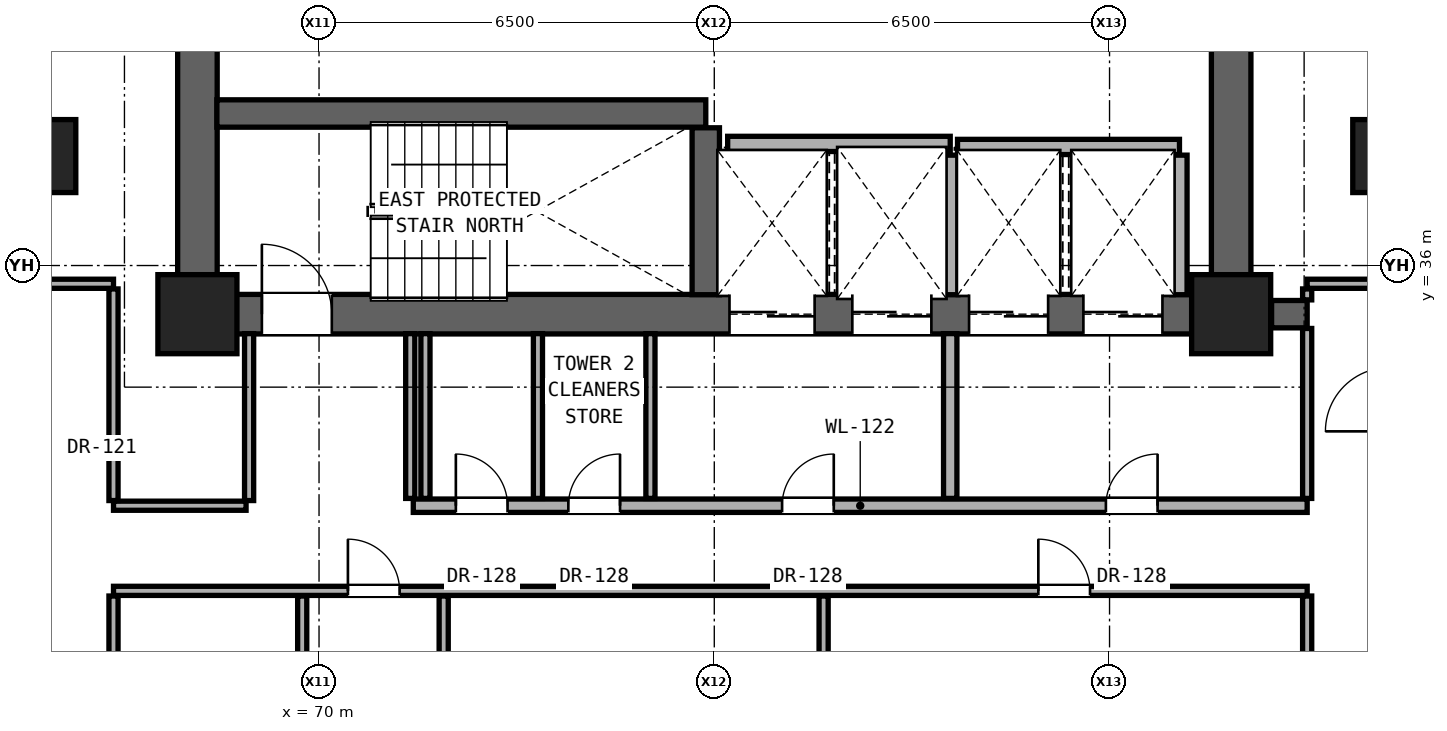
"""IFC4 building model, lengths in metres.
Left out: names, types, materials, properties, quantities, classifications, styles, units other than length and angle.
Written with IfcOpenShell. Run it as: python <this file> out.ifc"""

import sys

from ifc_helpers import new_model, si_unit, direction, frame, frame_2d, origin, origin_2d, place, context, subcontext, project, spatial, rectangle, extrude, element, fill, save


model = new_model("IFC4")
c1 = context("Model", 3, precision=1e-05, world=origin(), true_north=direction((0.0, 1.0)))
c2 = subcontext(c1, "Body", "Model", "MODEL_VIEW")
j1 = project(units=[si_unit("LENGTHUNIT", "METRE"), si_unit("PLANEANGLEUNIT", "RADIAN")], contexts=[c1])
p1 = place(None, origin())
s1 = spatial("IfcSite", under=j1, at=p1, CompositionType="ELEMENT")
p2 = place(p1, origin())
s2 = spatial("IfcBuilding", under=s1, at=p2, CompositionType="ELEMENT")
p3 = place(p2, frame((0.0, 0.0, 52.1)))
s3 = spatial("IfcBuildingStorey", under=s2, at=p3, CompositionType="ELEMENT", Elevation=52.1)
for number, where, z_axis, x_axis in (
    (1, (68.0, 35.2, 0.0), (0.0, 0.0, 1.0), (1.0, 0.0, 0.0)),
    (2, (85.0, 35.2, 0.0), (0.0, 0.0, 1.0), (1.0, 0.0, 0.0)),
):
    element("IfcColumn", number, at=place(p3, frame(where, z_axis=z_axis, x_axis=x_axis)), inside=s3, PredefinedType="COLUMN", context=c2, shape_type="SweptSolid", body=[
        extrude(rectangle(XDim=1.3, YDim=1.3, at=origin_2d()), origin(), (0.0, 0.0, 1.0), 3.3),
    ])
for number, where, z_axis, x_axis in (
    (3, (65.6, 37.8, 0.0), (0.0, 0.0, 1.0), (1.0, 0.0, 0.0)),
    (4, (87.4, 37.8, 0.0), (0.0, 0.0, 1.0), (1.0, 0.0, 0.0)),
):
    element("IfcColumn", number, at=place(p3, frame(where, z_axis=z_axis, x_axis=x_axis)), inside=s3, PredefinedType="PILASTER", context=c2, shape_type="SweptSolid", body=[
        extrude(rectangle(XDim=0.8, YDim=1.2, at=origin_2d()), origin(), (0.0, 0.0, 1.0), 3.3),
    ])
for number, where, z_axis, x_axis in (
    (5, (68.0, 35.2, 0.0), (0.0, 0.0, 1.0), (0.0, 1.0, 0.0)),
    (6, (85.0, 35.2, 0.0), (0.0, 0.0, 1.0), (0.0, 1.0, 0.0)),
):
    element("IfcWall", number, at=place(p3, frame(where, z_axis=z_axis, x_axis=x_axis)), inside=s3, PredefinedType="SHEAR", context=c2, shape_type="SweptSolid", body=[
        extrude(rectangle(XDim=5.6, YDim=0.65, at=frame_2d((2.8, 0.0))), origin(), (0.0, 0.0, 1.0), 3.06),
    ])
p4 = place(p3, frame((68.0, 35.2, 0.0), z_axis=(0.0, 0.0, 1.0), x_axis=(1.0, 0.0, 0.0)))
e7 = element("IfcWall", 7, at=p4, inside=s3, PredefinedType="SHEAR", context=c2, shape_type="SweptSolid", body=[
    extrude(rectangle(XDim=17.0, YDim=0.65, at=frame_2d((8.5, 0.0))), origin(), (0.0, 0.0, 1.0), 3.06),
])
p5 = place(p4, frame((1.06, 0.0, 0.0)))
e8 = element("IfcOpeningElement", 8, at=p5, cuts=e7, PredefinedType="OPENING", context=c2, shape_type="SweptSolid", body=[
    extrude(rectangle(XDim=1.15, YDim=2.2, at=frame_2d((0.575, 1.1))), frame((0.0, 0.335, 0.0), z_axis=(0.0, -1.0, 0.0), x_axis=(1.0, 0.0, 0.0)), (0.0, 0.0, 1.0), 0.67),
])
p6 = place(p4, frame((8.75, 0.0, 0.0)))
e9 = element("IfcOpeningElement", 9, at=p6, cuts=e7, PredefinedType="OPENING", context=c2, shape_type="SweptSolid", body=[
    extrude(rectangle(XDim=1.4, YDim=2.35, at=frame_2d((0.7, 1.175))), frame((0.0, 0.335, 0.0), z_axis=(0.0, -1.0, 0.0), x_axis=(1.0, 0.0, 0.0)), (0.0, 0.0, 1.0), 0.67),
])
p7 = place(p4, frame((10.77, 0.0, 0.0)))
e10 = element("IfcOpeningElement", 10, at=p7, cuts=e7, PredefinedType="OPENING", context=c2, shape_type="SweptSolid", body=[
    extrude(rectangle(XDim=1.3, YDim=2.3, at=frame_2d((0.65, 1.15))), frame((0.0, 0.335, 0.0), z_axis=(0.0, -1.0, 0.0), x_axis=(1.0, 0.0, 0.0)), (0.0, 0.0, 1.0), 0.67),
])
p8 = place(p4, frame((12.69, 0.0, 0.0)))
e11 = element("IfcOpeningElement", 11, at=p8, cuts=e7, PredefinedType="OPENING", context=c2, shape_type="SweptSolid", body=[
    extrude(rectangle(XDim=1.3, YDim=2.3, at=frame_2d((0.65, 1.15))), frame((0.0, 0.335, 0.0), z_axis=(0.0, -1.0, 0.0), x_axis=(1.0, 0.0, 0.0)), (0.0, 0.0, 1.0), 0.67),
])
p9 = place(p4, frame((14.57, 0.0, 0.0)))
e12 = element("IfcOpeningElement", 12, at=p9, cuts=e7, PredefinedType="OPENING", context=c2, shape_type="SweptSolid", body=[
    extrude(rectangle(XDim=1.3, YDim=2.3, at=frame_2d((0.65, 1.15))), frame((0.0, 0.335, 0.0), z_axis=(0.0, -1.0, 0.0), x_axis=(1.0, 0.0, 0.0)), (0.0, 0.0, 1.0), 0.67),
])
p10 = place(p3, frame((66.62, 30.65, 0.0), z_axis=(0.0, 0.0, 1.0), x_axis=(1.0, 0.0, 0.0)))
e13 = element("IfcWall", 13, at=p10, inside=s3, PredefinedType="PARTITIONING", context=c2, shape_type="SweptSolid", body=[
    extrude(rectangle(XDim=19.63, YDim=0.15, at=frame_2d((9.815, 0.0))), origin(), (0.0, 0.0, 1.0), 2.125),
])
p11 = place(p10, frame((3.855, 0.0, 0.0)))
e14 = element("IfcOpeningElement", 14, at=p11, cuts=e13, PredefinedType="OPENING", context=c2, shape_type="SweptSolid", body=[
    extrude(rectangle(XDim=0.85, YDim=2.01, at=frame_2d((0.425, 1.005))), frame((0.0, 0.085, 0.0), z_axis=(0.0, -1.0, 0.0), x_axis=(1.0, 0.0, 0.0)), (0.0, 0.0, 1.0), 0.17),
])
p12 = place(p10, frame((15.209, 0.0, 0.0)))
e15 = element("IfcOpeningElement", 15, at=p12, cuts=e13, PredefinedType="OPENING", context=c2, shape_type="SweptSolid", body=[
    extrude(rectangle(XDim=0.85, YDim=2.01, at=frame_2d((0.425, 1.005))), frame((0.0, 0.085, 0.0), z_axis=(0.0, -1.0, 0.0), x_axis=(1.0, 0.0, 0.0)), (0.0, 0.0, 1.0), 0.17),
])
p13 = place(p3, frame((66.62, 32.05, 0.0), z_axis=(0.0, 0.0, 1.0), x_axis=(1.0, 0.0, 0.0)))
e16 = element("IfcWall", 16, at=p13, inside=s3, PredefinedType="PARTITIONING", context=c2, shape_type="SweptSolid", body=[
    extrude(rectangle(XDim=2.18, YDim=0.15, at=frame_2d((1.09, 0.0))), origin(), (0.0, 0.0, 1.0), 2.125),
])
p14 = place(p3, frame((71.55, 32.05, 0.0), z_axis=(0.0, 0.0, 1.0), x_axis=(1.0, 0.0, 0.0)))
e17 = element("IfcWall", 17, at=p14, inside=s3, PredefinedType="SOLIDWALL", context=c2, shape_type="SweptSolid", body=[
    extrude(rectangle(XDim=14.7, YDim=0.22, at=frame_2d((7.35, 0.0))), origin(), (0.0, 0.0, 1.0), 2.125),
])
p15 = place(p14, frame((11.39, 0.0, 0.0)))
e18 = element("IfcOpeningElement", 18, at=p15, cuts=e17, PredefinedType="OPENING", context=c2, shape_type="SweptSolid", body=[
    extrude(rectangle(XDim=0.85, YDim=2.01, at=frame_2d((0.425, 1.005))), frame((0.0, 0.12, 0.0), z_axis=(0.0, -1.0, 0.0), x_axis=(1.0, 0.0, 0.0)), (0.0, 0.0, 1.0), 0.24),
])
p16 = place(p14, frame((6.065, 0.0, 0.0)))
e19 = element("IfcOpeningElement", 19, at=p16, cuts=e17, PredefinedType="OPENING", context=c2, shape_type="SweptSolid", body=[
    extrude(rectangle(XDim=0.85, YDim=2.01, at=frame_2d((0.425, 1.005))), frame((0.0, 0.12, 0.0), z_axis=(0.0, -1.0, 0.0), x_axis=(1.0, 0.0, 0.0)), (0.0, 0.0, 1.0), 0.24),
])
p17 = place(p14, frame((0.7, 0.0, 0.0)))
e20 = element("IfcOpeningElement", 20, at=p17, cuts=e17, PredefinedType="OPENING", context=c2, shape_type="SweptSolid", body=[
    extrude(rectangle(XDim=0.85, YDim=2.01, at=frame_2d((0.425, 1.005))), frame((0.0, 0.12, 0.0), z_axis=(0.0, -1.0, 0.0), x_axis=(1.0, 0.0, 0.0)), (0.0, 0.0, 1.0), 0.24),
])
p18 = place(p14, frame((2.55, 0.0, 0.0)))
e21 = element("IfcOpeningElement", 21, at=p18, cuts=e17, PredefinedType="OPENING", context=c2, shape_type="SweptSolid", body=[
    extrude(rectangle(XDim=0.85, YDim=2.01, at=frame_2d((0.425, 1.005))), frame((0.0, 0.12, 0.0), z_axis=(0.0, -1.0, 0.0), x_axis=(1.0, 0.0, 0.0)), (0.0, 0.0, 1.0), 0.24),
])
p19 = place(p3, frame((85.665, 35.2, 0.0), z_axis=(0.0, 0.0, 1.0), x_axis=(1.0, 0.0, 0.0)))
e22 = element("IfcWall", 22, at=p19, inside=s3, PredefinedType="SHEAR", context=c2, shape_type="SweptSolid", body=[
    extrude(rectangle(XDim=0.585, YDim=0.45, at=frame_2d((0.292, 0.0))), origin(), (0.0, 0.0, 1.0), 3.06),
])
p20 = place(p3, frame((65.25, 35.7, 0.0), z_axis=(0.0, 0.0, 1.0), x_axis=(1.0, 0.0, 0.0)))
e23 = element("IfcWall", 23, at=p20, inside=s3, PredefinedType="PARTITIONING", context=c2, shape_type="SweptSolid", body=[
    extrude(rectangle(XDim=1.37, YDim=0.15, at=frame_2d((0.685, 0.0))), origin(), (0.0, 0.0, 1.0), 3.06),
])
p21 = place(p3, frame((86.25, 35.7, 0.0), z_axis=(0.0, 0.0, 1.0), x_axis=(1.0, 0.0, 0.0)))
e24 = element("IfcWall", 24, at=p21, inside=s3, PredefinedType="PARTITIONING", context=c2, shape_type="SweptSolid", body=[
    extrude(rectangle(XDim=1.35, YDim=0.15, at=frame_2d((0.675, 0.0))), origin(), (0.0, 0.0, 1.0), 3.06),
])
p22 = place(p3, frame((80.5, 37.95, 0.0), z_axis=(0.0, 0.0, 1.0), x_axis=(1.0, 0.0, 0.0)))
e25 = element("IfcWall", 25, at=p22, inside=s3, PredefinedType="SOLIDWALL", context=c2, shape_type="SweptSolid", body=[
    extrude(rectangle(XDim=3.65, YDim=0.25, at=frame_2d((1.825, 0.0))), origin(), (0.0, 0.0, 1.0), 3.06),
])
p23 = place(p3, frame((76.72, 38.0, 0.0), z_axis=(0.0, 0.0, 1.0), x_axis=(1.0, 0.0, 0.0)))
e26 = element("IfcWall", 26, at=p23, inside=s3, PredefinedType="SOLIDWALL", context=c2, shape_type="SweptSolid", body=[
    extrude(rectangle(XDim=3.66, YDim=0.25, at=frame_2d((1.83, 0.0))), origin(), (0.0, 0.0, 1.0), 3.06),
])
p24 = place(p3, frame((68.32, 38.5, 0.0), z_axis=(0.0, 0.0, 1.0), x_axis=(1.0, 0.0, 0.0)))
e27 = element("IfcWall", 27, at=p24, inside=s3, PredefinedType="SHEAR", context=c2, shape_type="SweptSolid", body=[
    extrude(rectangle(XDim=8.04, YDim=0.45, at=frame_2d((4.02, 0.0))), origin(), (0.0, 0.0, 1.0), 3.06),
])
p25 = place(p3, frame((66.62, 24.935, 0.0), z_axis=(0.0, 0.0, 1.0), x_axis=(0.0, 1.0, 0.0)))
e28 = element("IfcWall", 28, at=p25, inside=s3, PredefinedType="PARTITIONING", context=c2, shape_type="SweptSolid", body=[
    extrude(rectangle(XDim=5.63, YDim=0.15, at=frame_2d((2.815, 0.0))), origin(), (0.0, 0.0, 1.0), 2.279),
])
p26 = place(p25, frame((2.34, 0.0, 0.0)))
e29 = element("IfcOpeningElement", 29, at=p26, cuts=e28, PredefinedType="OPENING", context=c2, shape_type="SweptSolid", body=[
    extrude(rectangle(XDim=0.95, YDim=2.15, at=frame_2d((0.475, 1.075))), frame((0.0, 0.085, 0.0), z_axis=(0.0, -1.0, 0.0), x_axis=(1.0, 0.0, 0.0)), (0.0, 0.0, 1.0), 0.17),
])
p27 = place(p3, frame((66.62, 32.135, 0.0), z_axis=(0.0, 0.0, 1.0), x_axis=(0.0, 1.0, 0.0)))
e30 = element("IfcWall", 30, at=p27, inside=s3, PredefinedType="PARTITIONING", context=c2, shape_type="SweptSolid", body=[
    extrude(rectangle(XDim=3.48, YDim=0.15, at=frame_2d((1.74, 0.0))), origin(), (0.0, 0.0, 1.0), 2.452),
])
p28 = place(p3, frame((68.85, 32.135, 0.0), z_axis=(0.0, 0.0, 1.0), x_axis=(0.0, 1.0, 0.0)))
e31 = element("IfcWall", 31, at=p28, inside=s3, PredefinedType="PARTITIONING", context=c2, shape_type="SweptSolid", body=[
    extrude(rectangle(XDim=2.745, YDim=0.15, at=frame_2d((1.373, 0.0))), origin(), (0.0, 0.0, 1.0), 3.06),
])
p29 = place(p3, frame((69.723, 24.935, 0.0), z_axis=(0.0, 0.0, 1.0), x_axis=(0.0, 1.0, 0.0)))
e32 = element("IfcWall", 32, at=p29, inside=s3, PredefinedType="PARTITIONING", context=c2, shape_type="SweptSolid", body=[
    extrude(rectangle(XDim=5.63, YDim=0.15, at=frame_2d((2.815, 0.0))), origin(), (0.0, 0.0, 1.0), 2.125),
])
for number, where, z_axis, x_axis in (
    (33, (71.5, 32.17, 0.0), (0.0, 0.0, 1.0), (0.0, 1.0, 0.0)),
    (34, (71.75, 32.17, 0.0), (0.0, 0.0, 1.0), (0.0, 1.0, 0.0)),
):
    element("IfcWall", number, at=place(p3, frame(where, z_axis=z_axis, x_axis=x_axis)), inside=s3, PredefinedType="PARTITIONING", context=c2, shape_type="SweptSolid", body=[
        extrude(rectangle(XDim=2.71, YDim=0.15, at=frame_2d((1.355, 0.0))), origin(), (0.0, 0.0, 1.0), 3.06),
    ])
p30 = place(p3, frame((72.05, 22.435, 0.0), z_axis=(0.0, 0.0, 1.0), x_axis=(0.0, 1.0, 0.0)))
e35 = element("IfcWall", 35, at=p30, inside=s3, PredefinedType="PARTITIONING", context=c2, shape_type="SweptSolid", body=[
    extrude(rectangle(XDim=8.13, YDim=0.15, at=frame_2d((4.065, 0.0))), origin(), (0.0, 0.0, 1.0), 2.125),
])
for number, where, z_axis, x_axis in (
    (36, (73.6, 32.17, 0.0), (0.0, 0.0, 1.0), (0.0, 1.0, 0.0)),
    (37, (75.45, 32.17, 0.0), (0.0, 0.0, 1.0), (0.0, 1.0, 0.0)),
):
    element("IfcWall", number, at=place(p3, frame(where, z_axis=z_axis, x_axis=x_axis)), inside=s3, PredefinedType="PARTITIONING", context=c2, shape_type="SweptSolid", body=[
        extrude(rectangle(XDim=2.71, YDim=0.15, at=frame_2d((1.355, 0.0))), origin(), (0.0, 0.0, 1.0), 3.06),
    ])
p31 = place(p3, frame((76.36, 35.52, 0.0), z_axis=(0.0, 0.0, 1.0), x_axis=(0.0, 1.0, 0.0)))
e38 = element("IfcWall", 38, at=p31, inside=s3, PredefinedType="SHEAR", context=c2, shape_type="SweptSolid", body=[
    extrude(rectangle(XDim=2.745, YDim=0.45, at=frame_2d((1.373, 0.0))), origin(), (0.0, 0.0, 1.0), 3.06),
])
p32 = place(p3, frame((78.298, 22.435, 0.0), z_axis=(0.0, 0.0, 1.0), x_axis=(0.0, 1.0, 0.0)))
e39 = element("IfcWall", 39, at=p32, inside=s3, PredefinedType="PARTITIONING", context=c2, shape_type="SweptSolid", body=[
    extrude(rectangle(XDim=8.13, YDim=0.15, at=frame_2d((4.065, 0.0))), origin(), (0.0, 0.0, 1.0), 2.125),
])
p33 = place(p3, frame((80.38, 32.17, 0.0), z_axis=(0.0, 0.0, 1.0), x_axis=(0.0, 1.0, 0.0)))
e40 = element("IfcWall", 40, at=p33, inside=s3, PredefinedType="SOLIDWALL", context=c2, shape_type="SweptSolid", body=[
    extrude(rectangle(XDim=2.71, YDim=0.22, at=frame_2d((1.355, 0.0))), origin(), (0.0, 0.0, 1.0), 3.06),
])
for number, where, z_axis, x_axis in (
    (41, (80.38, 35.52, 0.0), (0.0, 0.0, 1.0), (0.0, 1.0, 0.0)),
    (42, (84.15, 35.52, 0.0), (0.0, 0.0, 1.0), (0.0, 1.0, 0.0)),
):
    element("IfcWall", number, at=place(p3, frame(where, z_axis=z_axis, x_axis=x_axis)), inside=s3, PredefinedType="SOLIDWALL", context=c2, shape_type="SweptSolid", body=[
        extrude(rectangle(XDim=2.295, YDim=0.25, at=frame_2d((1.147, 0.0))), origin(), (0.0, 0.0, 1.0), 3.06),
    ])
p34 = place(p3, frame((86.25, 22.435, 0.0), z_axis=(0.0, 0.0, 1.0), x_axis=(0.0, 1.0, 0.0)))
e43 = element("IfcWall", 43, at=p34, inside=s3, PredefinedType="PARTITIONING", context=c2, shape_type="SweptSolid", body=[
    extrude(rectangle(XDim=8.13, YDim=0.15, at=frame_2d((4.065, 0.0))), origin(), (0.0, 0.0, 1.0), 2.279),
])
p35 = place(p3, frame((86.25, 32.17, 0.0), z_axis=(0.0, 0.0, 1.0), x_axis=(0.0, 1.0, 0.0)))
e44 = element("IfcWall", 44, at=p35, inside=s3, PredefinedType="PARTITIONING", context=c2, shape_type="SweptSolid", body=[
    extrude(rectangle(XDim=2.795, YDim=0.15, at=frame_2d((1.397, 0.0))), origin(), (0.0, 0.0, 1.0), 2.452),
])
p36 = place(p3, frame((86.25, 35.435, 0.0), z_axis=(0.0, 0.0, 1.0), x_axis=(0.0, 1.0, 0.0)))
e45 = element("IfcWall", 45, at=p36, inside=s3, PredefinedType="PARTITIONING", context=c2, shape_type="SweptSolid", body=[
    extrude(rectangle(XDim=0.18, YDim=0.15, at=frame_2d((0.09, 0.0))), origin(), (0.0, 0.0, 1.0), 2.452),
])
p37 = place(p15, origin())
e46 = element("IfcDoor", 46, at=p37, inside=s3, OperationType="SINGLE_SWING_RIGHT", PredefinedType="DOOR", context=c2, shape_type="SweptSolid", body=[
    extrude(rectangle(XDim=0.85, YDim=2.01, at=frame_2d((0.425, 1.005))), frame((0.0, 0.025, 0.0), z_axis=(0.0, -1.0, 0.0), x_axis=(1.0, 0.0, 0.0)), (0.0, 0.0, 1.0), 0.05),
])
fill(e18, e46)
p38 = place(p5, origin())
e47 = element("IfcDoor", 47, at=p38, inside=s3, OperationType="SINGLE_SWING_LEFT", PredefinedType="DOOR", context=c2, shape_type="SweptSolid", body=[
    extrude(rectangle(XDim=1.15, YDim=2.2, at=frame_2d((0.575, 1.1))), frame((0.0, 0.025, 0.0), z_axis=(0.0, -1.0, 0.0), x_axis=(1.0, 0.0, 0.0)), (0.0, 0.0, 1.0), 0.05),
])
fill(e8, e47)
p39 = place(p16, origin())
e48 = element("IfcDoor", 48, at=p39, inside=s3, OperationType="SINGLE_SWING_RIGHT", PredefinedType="DOOR", context=c2, shape_type="SweptSolid", body=[
    extrude(rectangle(XDim=0.85, YDim=2.01, at=frame_2d((0.425, 1.005))), frame((0.0, 0.025, 0.0), z_axis=(0.0, -1.0, 0.0), x_axis=(1.0, 0.0, 0.0)), (0.0, 0.0, 1.0), 0.05),
])
fill(e19, e48)
p40 = place(p17, origin())
e49 = element("IfcDoor", 49, at=p40, inside=s3, OperationType="SINGLE_SWING_LEFT", PredefinedType="DOOR", context=c2, shape_type="SweptSolid", body=[
    extrude(rectangle(XDim=0.85, YDim=2.01, at=frame_2d((0.425, 1.005))), frame((0.0, 0.025, 0.0), z_axis=(0.0, -1.0, 0.0), x_axis=(1.0, 0.0, 0.0)), (0.0, 0.0, 1.0), 0.05),
])
fill(e20, e49)
p41 = place(p18, origin())
e50 = element("IfcDoor", 50, at=p41, inside=s3, OperationType="SINGLE_SWING_RIGHT", PredefinedType="DOOR", context=c2, shape_type="SweptSolid", body=[
    extrude(rectangle(XDim=0.85, YDim=2.01, at=frame_2d((0.425, 1.005))), frame((0.0, 0.025, 0.0), z_axis=(0.0, -1.0, 0.0), x_axis=(1.0, 0.0, 0.0)), (0.0, 0.0, 1.0), 0.05),
])
fill(e21, e50)
p42 = place(p11, origin())
e51 = element("IfcDoor", 51, at=p42, inside=s3, OperationType="SINGLE_SWING_LEFT", PredefinedType="DOOR", context=c2, shape_type="SweptSolid", body=[
    extrude(rectangle(XDim=0.85, YDim=2.01, at=frame_2d((0.425, 1.005))), frame((0.0, 0.025, 0.0), z_axis=(0.0, -1.0, 0.0), x_axis=(1.0, 0.0, 0.0)), (0.0, 0.0, 1.0), 0.05),
])
fill(e14, e51)
p43 = place(p12, origin())
e52 = element("IfcDoor", 52, at=p43, inside=s3, OperationType="SINGLE_SWING_LEFT", PredefinedType="DOOR", context=c2, shape_type="SweptSolid", body=[
    extrude(rectangle(XDim=0.85, YDim=2.01, at=frame_2d((0.425, 1.005))), frame((0.0, 0.025, 0.0), z_axis=(0.0, -1.0, 0.0), x_axis=(1.0, 0.0, 0.0)), (0.0, 0.0, 1.0), 0.05),
])
fill(e15, e52)
p44 = place(p6, origin())
e53 = element("IfcDoor", 53, at=p44, inside=s3, OperationType="DOUBLE_DOOR_SLIDING", PredefinedType="DOOR", context=c2, shape_type="SweptSolid", body=[
    extrude(rectangle(XDim=1.4, YDim=2.35, at=frame_2d((0.7, 1.175))), frame((0.0, 0.025, 0.0), z_axis=(0.0, -1.0, 0.0), x_axis=(1.0, 0.0, 0.0)), (0.0, 0.0, 1.0), 0.05),
])
fill(e9, e53)
p45 = place(p7, origin())
e54 = element("IfcDoor", 54, at=p45, inside=s3, OperationType="DOUBLE_DOOR_SLIDING", PredefinedType="DOOR", context=c2, shape_type="SweptSolid", body=[
    extrude(rectangle(XDim=1.3, YDim=2.3, at=frame_2d((0.65, 1.15))), frame((0.0, 0.025, 0.0), z_axis=(0.0, -1.0, 0.0), x_axis=(1.0, 0.0, 0.0)), (0.0, 0.0, 1.0), 0.05),
])
fill(e10, e54)
p46 = place(p8, origin())
e55 = element("IfcDoor", 55, at=p46, inside=s3, OperationType="DOUBLE_DOOR_SLIDING", PredefinedType="DOOR", context=c2, shape_type="SweptSolid", body=[
    extrude(rectangle(XDim=1.3, YDim=2.3, at=frame_2d((0.65, 1.15))), frame((0.0, 0.025, 0.0), z_axis=(0.0, -1.0, 0.0), x_axis=(1.0, 0.0, 0.0)), (0.0, 0.0, 1.0), 0.05),
])
fill(e11, e55)
p47 = place(p9, origin())
e56 = element("IfcDoor", 56, at=p47, inside=s3, OperationType="DOUBLE_DOOR_SLIDING", PredefinedType="DOOR", context=c2, shape_type="SweptSolid", body=[
    extrude(rectangle(XDim=1.3, YDim=2.3, at=frame_2d((0.65, 1.15))), frame((0.0, 0.025, 0.0), z_axis=(0.0, -1.0, 0.0), x_axis=(1.0, 0.0, 0.0)), (0.0, 0.0, 1.0), 0.05),
])
fill(e12, e56)
save(model, sys.argv[1])
